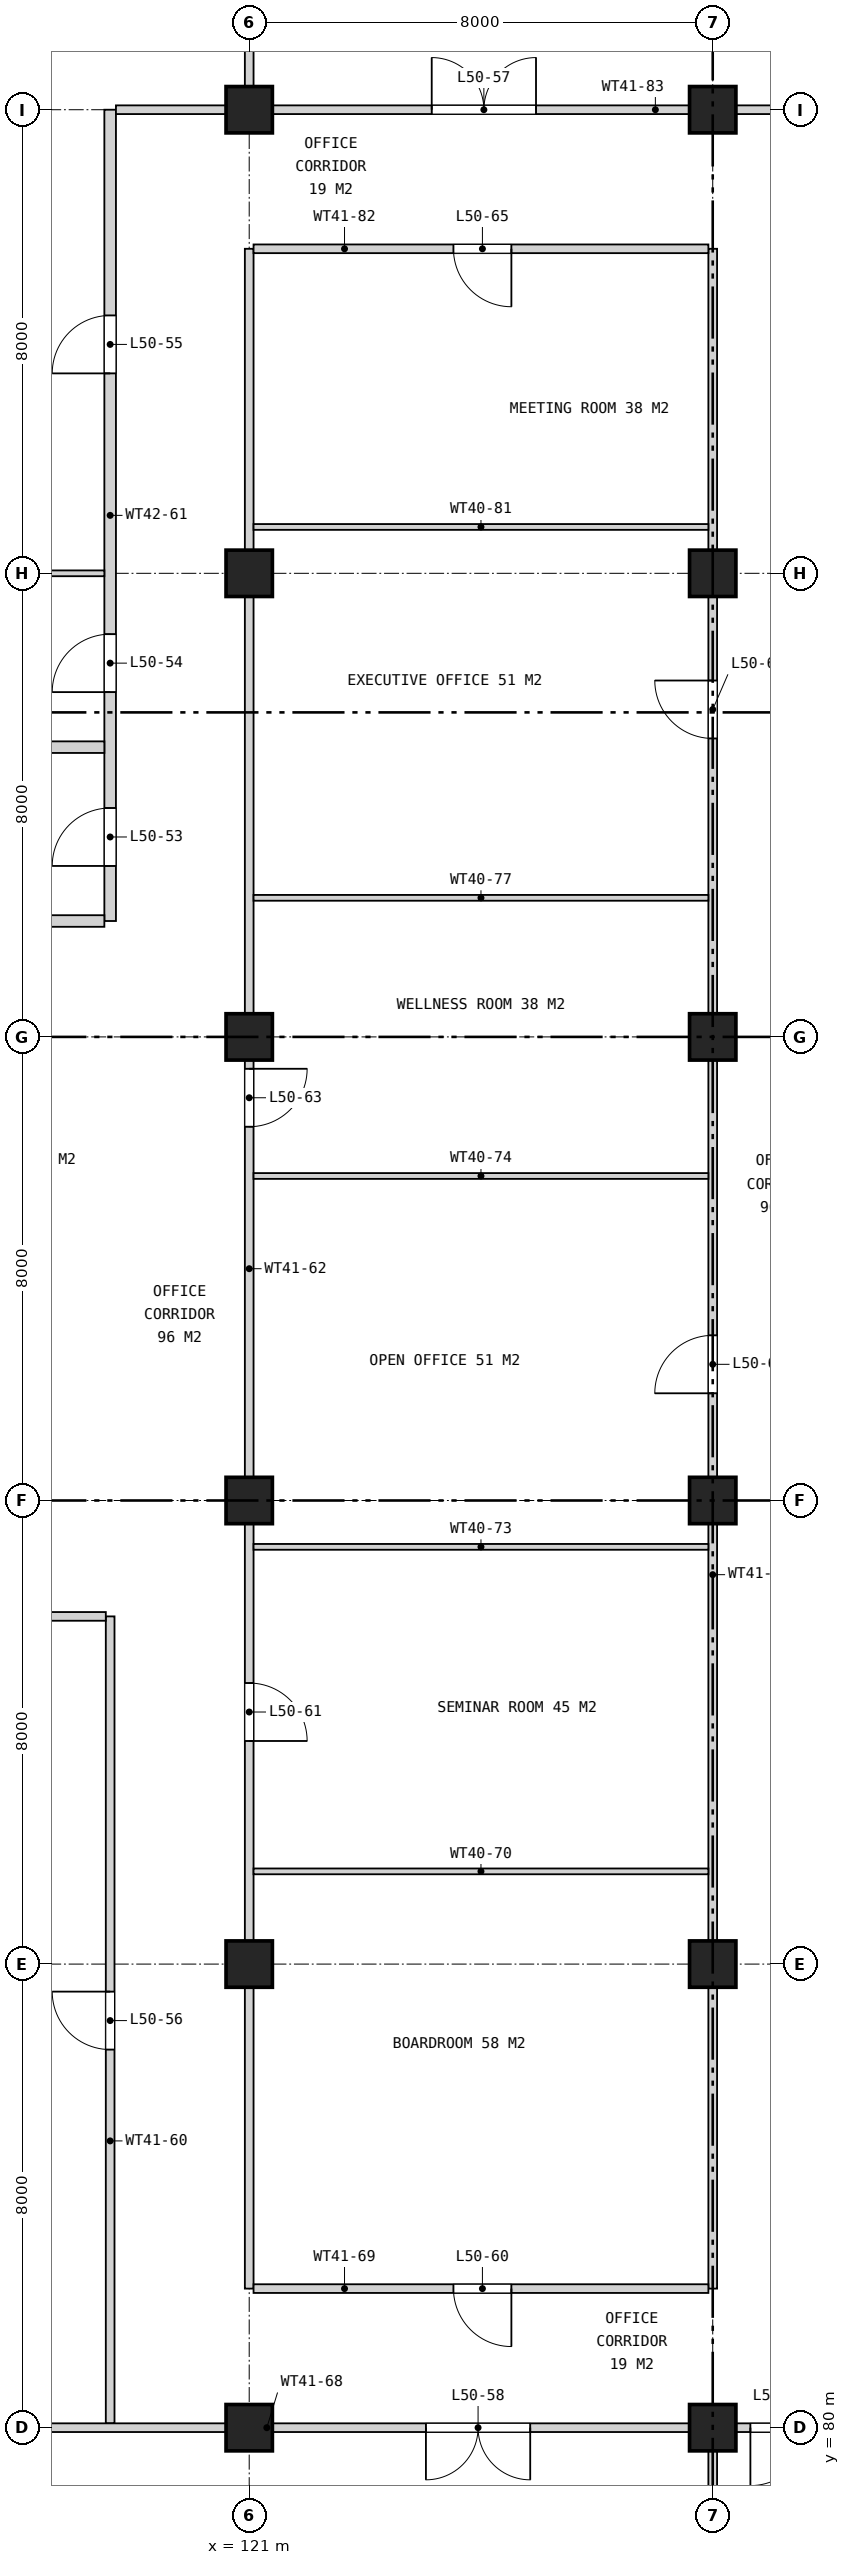
"""IFC4 building model, lengths in metres.
Left out: names, types, materials, properties, quantities, classifications, styles, units other than length and angle.
Written with IfcOpenShell. Run it as: python <this file> out.ifc"""

import sys

from ifc_helpers import new_model, si_unit, direction, frame, frame_2d, origin, origin_2d, place, context, subcontext, project, spatial, rectangle, extrude, element, fill, save


model = new_model("IFC4")
c1 = context("Model", 3, precision=1e-05, world=origin(), true_north=direction((0.0, 1.0)))
c2 = subcontext(c1, "Body", "Model", "MODEL_VIEW")
j1 = project(units=[si_unit("LENGTHUNIT", "METRE"), si_unit("PLANEANGLEUNIT", "RADIAN")], contexts=[c1])
p1 = place(None, origin())
s1 = spatial("IfcSite", under=j1, at=p1, CompositionType="ELEMENT")
p2 = place(p1, origin())
s2 = spatial("IfcBuilding", under=s1, at=p2, CompositionType="ELEMENT")
p3 = place(p2, frame((0.0, 0.0, 233.5)))
s3 = spatial("IfcBuildingStorey", under=s2, at=p3, CompositionType="ELEMENT", Elevation=233.5)
for number, where, z_axis, x_axis in (
    (1, (121.0, 80.0, 0.0), (0.0, 0.0, 1.0), (1.0, 0.0, 0.0)),
    (2, (121.0, 88.0, 0.0), (0.0, 0.0, 1.0), (1.0, 0.0, 0.0)),
    (3, (121.0, 96.0, 0.0), (0.0, 0.0, 1.0), (1.0, 0.0, 0.0)),
    (4, (121.0, 104.0, 0.0), (0.0, 0.0, 1.0), (1.0, 0.0, 0.0)),
    (5, (121.0, 112.0, 0.0), (0.0, 0.0, 1.0), (1.0, 0.0, 0.0)),
    (6, (121.0, 120.0, 0.0), (0.0, 0.0, 1.0), (1.0, 0.0, 0.0)),
    (7, (129.0, 80.0, 0.0), (0.0, 0.0, 1.0), (1.0, 0.0, 0.0)),
    (8, (129.0, 88.0, 0.0), (0.0, 0.0, 1.0), (1.0, 0.0, 0.0)),
    (9, (129.0, 96.0, 0.0), (0.0, 0.0, 1.0), (1.0, 0.0, 0.0)),
    (10, (129.0, 104.0, 0.0), (0.0, 0.0, 1.0), (1.0, 0.0, 0.0)),
    (11, (129.0, 112.0, 0.0), (0.0, 0.0, 1.0), (1.0, 0.0, 0.0)),
    (12, (129.0, 120.0, 0.0), (0.0, 0.0, 1.0), (1.0, 0.0, 0.0)),
):
    element("IfcColumn", number, at=place(p3, frame(where, z_axis=z_axis, x_axis=x_axis)), inside=s3, PredefinedType="COLUMN", context=c2, shape_type="SweptSolid", body=[
        extrude(rectangle(XDim=0.8, YDim=0.8, at=origin_2d()), origin(), (0.0, 0.0, 1.0), 4.2),
    ])
p4 = place(p3, frame((118.6, 80.075, 0.0), z_axis=(0.0, 0.0, 1.0), x_axis=(0.0, 1.0, 0.0)))
e13 = element("IfcWall", 13, at=p4, inside=s3, PredefinedType="PARTITIONING", context=c2, shape_type="SweptSolid", body=[
    extrude(rectangle(XDim=13.925, YDim=0.15, at=frame_2d((6.962, 0.0))), origin(), (0.0, 0.0, 1.0), 3.255),
])
p5 = place(p4, frame((6.45, 0.0, 0.0)))
e14 = element("IfcOpeningElement", 14, at=p5, cuts=e13, PredefinedType="OPENING", context=c2, shape_type="SweptSolid", body=[
    extrude(rectangle(XDim=1.0, YDim=2.1, at=frame_2d((0.5, 1.05))), frame((0.0, 0.085, 0.0), z_axis=(0.0, -1.0, 0.0), x_axis=(1.0, 0.0, 0.0)), (0.0, 0.0, 1.0), 0.17),
])
p6 = place(p3, frame((118.6, 106.0, 0.0), z_axis=(0.0, 0.0, 1.0), x_axis=(0.0, 1.0, 0.0)))
e15 = element("IfcWall", 15, at=p6, inside=s3, PredefinedType="SOLIDWALL", context=c2, shape_type="SweptSolid", body=[
    extrude(rectangle(XDim=14.0, YDim=0.2, at=frame_2d((7.0, 0.0))), origin(), (0.0, 0.0, 1.0), 3.255),
])
p7 = place(p6, frame((0.95, 0.0, 0.0)))
e16 = element("IfcOpeningElement", 16, at=p7, cuts=e15, PredefinedType="OPENING", context=c2, shape_type="SweptSolid", body=[
    extrude(rectangle(XDim=1.0, YDim=2.1, at=frame_2d((0.5, 1.05))), frame((0.0, 0.11, 0.0), z_axis=(0.0, -1.0, 0.0), x_axis=(1.0, 0.0, 0.0)), (0.0, 0.0, 1.0), 0.22),
])
p8 = place(p6, frame((3.95, 0.0, 0.0)))
e17 = element("IfcOpeningElement", 17, at=p8, cuts=e15, PredefinedType="OPENING", context=c2, shape_type="SweptSolid", body=[
    extrude(rectangle(XDim=1.0, YDim=2.1, at=frame_2d((0.5, 1.05))), frame((0.0, 0.11, 0.0), z_axis=(0.0, -1.0, 0.0), x_axis=(1.0, 0.0, 0.0)), (0.0, 0.0, 1.0), 0.22),
])
p9 = place(p6, frame((9.45, 0.0, 0.0)))
e18 = element("IfcOpeningElement", 18, at=p9, cuts=e15, PredefinedType="OPENING", context=c2, shape_type="SweptSolid", body=[
    extrude(rectangle(XDim=1.0, YDim=2.1, at=frame_2d((0.5, 1.05))), frame((0.0, 0.11, 0.0), z_axis=(0.0, -1.0, 0.0), x_axis=(1.0, 0.0, 0.0)), (0.0, 0.0, 1.0), 0.22),
])
p10 = place(p3, frame((121.0, 82.4, 0.0), z_axis=(0.0, 0.0, 1.0), x_axis=(0.0, 1.0, 0.0)))
e19 = element("IfcWall", 19, at=p10, inside=s3, PredefinedType="PARTITIONING", context=c2, shape_type="SweptSolid", body=[
    extrude(rectangle(XDim=35.2, YDim=0.15, at=frame_2d((17.6, 0.0))), origin(), (0.0, 0.0, 1.0), 3.255),
])
p11 = place(p10, frame((9.45, 0.0, 0.0)))
e20 = element("IfcOpeningElement", 20, at=p11, cuts=e19, PredefinedType="OPENING", context=c2, shape_type="SweptSolid", body=[
    extrude(rectangle(XDim=1.0, YDim=2.1, at=frame_2d((0.5, 1.05))), frame((0.0, 0.085, 0.0), z_axis=(0.0, -1.0, 0.0), x_axis=(1.0, 0.0, 0.0)), (0.0, 0.0, 1.0), 0.17),
])
p12 = place(p10, frame((20.05, 0.0, 0.0)))
e21 = element("IfcOpeningElement", 21, at=p12, cuts=e19, PredefinedType="OPENING", context=c2, shape_type="SweptSolid", body=[
    extrude(rectangle(XDim=1.0, YDim=2.1, at=frame_2d((0.5, 1.05))), frame((0.0, 0.085, 0.0), z_axis=(0.0, -1.0, 0.0), x_axis=(1.0, 0.0, 0.0)), (0.0, 0.0, 1.0), 0.17),
])
for number, where, z_axis, x_axis in (
    (22, (121.0, 120.075, 0.0), (0.0, 0.0, 1.0), (0.0, 1.0, 0.0)),
    (23, (129.0, 71.68, 0.0), (0.0, 0.0, 1.0), (0.0, 1.0, 0.0)),
):
    element("IfcWall", number, at=place(p3, frame(where, z_axis=z_axis, x_axis=x_axis)), inside=s3, PredefinedType="PARTITIONING", context=c2, shape_type="SweptSolid", body=[
        extrude(rectangle(XDim=8.245, YDim=0.15, at=frame_2d((4.123, 0.0))), origin(), (0.0, 0.0, 1.0), 3.255),
    ])
p13 = place(p3, frame((129.0, 82.4, 0.0), z_axis=(0.0, 0.0, 1.0), x_axis=(0.0, 1.0, 0.0)))
e24 = element("IfcWall", 24, at=p13, inside=s3, PredefinedType="PARTITIONING", context=c2, shape_type="SweptSolid", body=[
    extrude(rectangle(XDim=35.2, YDim=0.15, at=frame_2d((17.6, 0.0))), origin(), (0.0, 0.0, 1.0), 3.255),
])
p14 = place(p13, frame((15.45, 0.0, 0.0)))
e25 = element("IfcOpeningElement", 25, at=p14, cuts=e24, PredefinedType="OPENING", context=c2, shape_type="SweptSolid", body=[
    extrude(rectangle(XDim=1.0, YDim=2.1, at=frame_2d((0.5, 1.05))), frame((0.0, 0.085, 0.0), z_axis=(0.0, -1.0, 0.0), x_axis=(1.0, 0.0, 0.0)), (0.0, 0.0, 1.0), 0.17),
])
p15 = place(p13, frame((26.75, 0.0, 0.0)))
e26 = element("IfcOpeningElement", 26, at=p15, cuts=e24, PredefinedType="OPENING", context=c2, shape_type="SweptSolid", body=[
    extrude(rectangle(XDim=1.0, YDim=2.1, at=frame_2d((0.5, 1.05))), frame((0.0, 0.085, 0.0), z_axis=(0.0, -1.0, 0.0), x_axis=(1.0, 0.0, 0.0)), (0.0, 0.0, 1.0), 0.17),
])
p16 = place(p3, frame((112.68, 80.0, 0.0), z_axis=(0.0, 0.0, 1.0), x_axis=(1.0, 0.0, 0.0)))
e27 = element("IfcWall", 27, at=p16, inside=s3, PredefinedType="PARTITIONING", context=c2, shape_type="SweptSolid", body=[
    extrude(rectangle(XDim=24.64, YDim=0.15, at=frame_2d((12.32, 0.0))), origin(), (0.0, 0.0, 1.0), 3.255),
])
p17 = place(p16, frame((11.37, 0.0, 0.0)))
e28 = element("IfcOpeningElement", 28, at=p17, cuts=e27, PredefinedType="OPENING", context=c2, shape_type="SweptSolid", body=[
    extrude(rectangle(XDim=1.8, YDim=2.1, at=frame_2d((0.9, 1.05))), frame((0.0, 0.085, 0.0), z_axis=(0.0, -1.0, 0.0), x_axis=(1.0, 0.0, 0.0)), (0.0, 0.0, 1.0), 0.17),
])
p18 = place(p16, frame((16.97, 0.0, 0.0)))
e29 = element("IfcOpeningElement", 29, at=p18, cuts=e27, PredefinedType="OPENING", context=c2, shape_type="SweptSolid", body=[
    extrude(rectangle(XDim=1.0, YDim=2.1, at=frame_2d((0.5, 1.05))), frame((0.0, 0.085, 0.0), z_axis=(0.0, -1.0, 0.0), x_axis=(1.0, 0.0, 0.0)), (0.0, 0.0, 1.0), 0.17),
])
p19 = place(p3, frame((121.075, 82.4, 0.0), z_axis=(0.0, 0.0, 1.0), x_axis=(1.0, 0.0, 0.0)))
e30 = element("IfcWall", 30, at=p19, inside=s3, PredefinedType="PARTITIONING", context=c2, shape_type="SweptSolid", body=[
    extrude(rectangle(XDim=7.85, YDim=0.15, at=frame_2d((3.925, 0.0))), origin(), (0.0, 0.0, 1.0), 3.255),
])
p20 = place(p19, frame((3.45, 0.0, 0.0)))
e31 = element("IfcOpeningElement", 31, at=p20, cuts=e30, PredefinedType="OPENING", context=c2, shape_type="SweptSolid", body=[
    extrude(rectangle(XDim=1.0, YDim=2.1, at=frame_2d((0.5, 1.05))), frame((0.0, 0.085, 0.0), z_axis=(0.0, -1.0, 0.0), x_axis=(1.0, 0.0, 0.0)), (0.0, 0.0, 1.0), 0.17),
])
p21 = place(p3, frame((121.075, 89.6, 0.0), z_axis=(0.0, 0.0, 1.0), x_axis=(1.0, 0.0, 0.0)))
e32 = element("IfcWall", 32, at=p21, inside=s3, PredefinedType="PARTITIONING", context=c2, shape_type="SweptSolid", body=[
    extrude(rectangle(XDim=7.85, YDim=0.1, at=frame_2d((3.925, 0.0))), origin(), (0.0, 0.0, 1.0), 3.255),
])
p22 = place(p3, frame((113.0, 94.0, 0.0), z_axis=(0.0, 0.0, 1.0), x_axis=(1.0, 0.0, 0.0)))
e33 = element("IfcWall", 33, at=p22, inside=s3, PredefinedType="PARTITIONING", context=c2, shape_type="SweptSolid", body=[
    extrude(rectangle(XDim=5.525, YDim=0.15, at=frame_2d((2.762, 0.0))), origin(), (0.0, 0.0, 1.0), 3.255),
])
for number, where, z_axis, x_axis in (
    (34, (121.075, 95.2, 0.0), (0.0, 0.0, 1.0), (1.0, 0.0, 0.0)),
    (35, (121.075, 101.6, 0.0), (0.0, 0.0, 1.0), (1.0, 0.0, 0.0)),
):
    element("IfcWall", number, at=place(p3, frame(where, z_axis=z_axis, x_axis=x_axis)), inside=s3, PredefinedType="PARTITIONING", context=c2, shape_type="SweptSolid", body=[
        extrude(rectangle(XDim=7.85, YDim=0.1, at=frame_2d((3.925, 0.0))), origin(), (0.0, 0.0, 1.0), 3.255),
    ])
p23 = place(p3, frame((113.0, 106.0, 0.0), z_axis=(0.0, 0.0, 1.0), x_axis=(1.0, 0.0, 0.0)))
e36 = element("IfcWall", 36, at=p23, inside=s3, PredefinedType="SOLIDWALL", context=c2, shape_type="SweptSolid", body=[
    extrude(rectangle(XDim=5.5, YDim=0.2, at=frame_2d((2.75, 0.0))), origin(), (0.0, 0.0, 1.0), 3.255),
])
p24 = place(p3, frame((121.075, 106.4, 0.0), z_axis=(0.0, 0.0, 1.0), x_axis=(1.0, 0.0, 0.0)))
e37 = element("IfcWall", 37, at=p24, inside=s3, PredefinedType="PARTITIONING", context=c2, shape_type="SweptSolid", body=[
    extrude(rectangle(XDim=7.85, YDim=0.1, at=frame_2d((3.925, 0.0))), origin(), (0.0, 0.0, 1.0), 3.255),
])
p25 = place(p3, frame((113.0, 109.0, 0.0), z_axis=(0.0, 0.0, 1.0), x_axis=(1.0, 0.0, 0.0)))
e38 = element("IfcWall", 38, at=p25, inside=s3, PredefinedType="SOLIDWALL", context=c2, shape_type="SweptSolid", body=[
    extrude(rectangle(XDim=5.5, YDim=0.2, at=frame_2d((2.75, 0.0))), origin(), (0.0, 0.0, 1.0), 3.255),
])
p26 = place(p3, frame((113.0, 112.0, 0.0), z_axis=(0.0, 0.0, 1.0), x_axis=(1.0, 0.0, 0.0)))
e39 = element("IfcWall", 39, at=p26, inside=s3, PredefinedType="PARTITIONING", context=c2, shape_type="SweptSolid", body=[
    extrude(rectangle(XDim=5.5, YDim=0.1, at=frame_2d((2.75, 0.0))), origin(), (0.0, 0.0, 1.0), 3.255),
])
p27 = place(p3, frame((121.075, 112.8, 0.0), z_axis=(0.0, 0.0, 1.0), x_axis=(1.0, 0.0, 0.0)))
e40 = element("IfcWall", 40, at=p27, inside=s3, PredefinedType="PARTITIONING", context=c2, shape_type="SweptSolid", body=[
    extrude(rectangle(XDim=7.85, YDim=0.1, at=frame_2d((3.925, 0.0))), origin(), (0.0, 0.0, 1.0), 3.255),
])
p28 = place(p3, frame((121.075, 117.6, 0.0), z_axis=(0.0, 0.0, 1.0), x_axis=(1.0, 0.0, 0.0)))
e41 = element("IfcWall", 41, at=p28, inside=s3, PredefinedType="PARTITIONING", context=c2, shape_type="SweptSolid", body=[
    extrude(rectangle(XDim=7.85, YDim=0.15, at=frame_2d((3.925, 0.0))), origin(), (0.0, 0.0, 1.0), 3.255),
])
p29 = place(p28, frame((3.45, 0.0, 0.0)))
e42 = element("IfcOpeningElement", 42, at=p29, cuts=e41, PredefinedType="OPENING", context=c2, shape_type="SweptSolid", body=[
    extrude(rectangle(XDim=1.0, YDim=2.1, at=frame_2d((0.5, 1.05))), frame((0.0, 0.085, 0.0), z_axis=(0.0, -1.0, 0.0), x_axis=(1.0, 0.0, 0.0)), (0.0, 0.0, 1.0), 0.17),
])
p30 = place(p3, frame((118.7, 120.0, 0.0), z_axis=(0.0, 0.0, 1.0), x_axis=(1.0, 0.0, 0.0)))
e43 = element("IfcWall", 43, at=p30, inside=s3, PredefinedType="PARTITIONING", context=c2, shape_type="SweptSolid", body=[
    extrude(rectangle(XDim=18.62, YDim=0.15, at=frame_2d((9.31, 0.0))), origin(), (0.0, 0.0, 1.0), 3.255),
])
p31 = place(p30, frame((5.45, 0.0, 0.0)))
e44 = element("IfcOpeningElement", 44, at=p31, cuts=e43, PredefinedType="OPENING", context=c2, shape_type="SweptSolid", body=[
    extrude(rectangle(XDim=1.8, YDim=2.1, at=frame_2d((0.9, 1.05))), frame((0.0, 0.085, 0.0), z_axis=(0.0, -1.0, 0.0), x_axis=(1.0, 0.0, 0.0)), (0.0, 0.0, 1.0), 0.17),
])
p32 = place(p7, origin())
e45 = element("IfcDoor", 45, at=p32, inside=s3, OperationType="SINGLE_SWING_LEFT", PredefinedType="DOOR", context=c2, shape_type="SweptSolid", body=[
    extrude(rectangle(XDim=1.0, YDim=2.1, at=frame_2d((0.5, 1.05))), frame((0.0, 0.025, 0.0), z_axis=(0.0, -1.0, 0.0), x_axis=(1.0, 0.0, 0.0)), (0.0, 0.0, 1.0), 0.05),
])
fill(e16, e45)
p33 = place(p8, origin())
e46 = element("IfcDoor", 46, at=p33, inside=s3, OperationType="SINGLE_SWING_LEFT", PredefinedType="DOOR", context=c2, shape_type="SweptSolid", body=[
    extrude(rectangle(XDim=1.0, YDim=2.1, at=frame_2d((0.5, 1.05))), frame((0.0, 0.025, 0.0), z_axis=(0.0, -1.0, 0.0), x_axis=(1.0, 0.0, 0.0)), (0.0, 0.0, 1.0), 0.05),
])
fill(e17, e46)
p34 = place(p9, origin())
e47 = element("IfcDoor", 47, at=p34, inside=s3, OperationType="SINGLE_SWING_LEFT", PredefinedType="DOOR", context=c2, shape_type="SweptSolid", body=[
    extrude(rectangle(XDim=1.0, YDim=2.1, at=frame_2d((0.5, 1.05))), frame((0.0, 0.025, 0.0), z_axis=(0.0, -1.0, 0.0), x_axis=(1.0, 0.0, 0.0)), (0.0, 0.0, 1.0), 0.05),
])
fill(e18, e47)
p35 = place(p5, origin())
e48 = element("IfcDoor", 48, at=p35, inside=s3, OperationType="SINGLE_SWING_RIGHT", PredefinedType="DOOR", context=c2, shape_type="SweptSolid", body=[
    extrude(rectangle(XDim=1.0, YDim=2.1, at=frame_2d((0.5, 1.05))), frame((0.0, 0.025, 0.0), z_axis=(0.0, -1.0, 0.0), x_axis=(1.0, 0.0, 0.0)), (0.0, 0.0, 1.0), 0.05),
])
fill(e14, e48)
p36 = place(p31, origin())
e49 = element("IfcDoor", 49, at=p36, inside=s3, OperationType="DOUBLE_DOOR_SINGLE_SWING", PredefinedType="DOOR", context=c2, shape_type="SweptSolid", body=[
    extrude(rectangle(XDim=1.8, YDim=2.1, at=frame_2d((0.9, 1.05))), frame((0.0, 0.025, 0.0), z_axis=(0.0, -1.0, 0.0), x_axis=(1.0, 0.0, 0.0)), (0.0, 0.0, 1.0), 0.05),
])
fill(e44, e49)
p37 = place(p17, frame((1.8, 0.0, 0.0), z_axis=(0.0, 0.0, 1.0), x_axis=(-1.0, 0.0, 0.0)))
e50 = element("IfcDoor", 50, at=p37, inside=s3, OperationType="DOUBLE_DOOR_SINGLE_SWING", PredefinedType="DOOR", context=c2, shape_type="SweptSolid", body=[
    extrude(rectangle(XDim=1.8, YDim=2.1, at=frame_2d((0.9, 1.05))), frame((0.0, 0.025, 0.0), z_axis=(0.0, -1.0, 0.0), x_axis=(1.0, 0.0, 0.0)), (0.0, 0.0, 1.0), 0.05),
])
fill(e28, e50)
p38 = place(p18, frame((1.0, 0.0, 0.0), z_axis=(0.0, 0.0, 1.0), x_axis=(-1.0, 0.0, 0.0)))
e51 = element("IfcDoor", 51, at=p38, inside=s3, OperationType="SINGLE_SWING_RIGHT", PredefinedType="DOOR", context=c2, shape_type="SweptSolid", body=[
    extrude(rectangle(XDim=1.0, YDim=2.1, at=frame_2d((0.5, 1.05))), frame((0.0, 0.025, 0.0), z_axis=(0.0, -1.0, 0.0), x_axis=(1.0, 0.0, 0.0)), (0.0, 0.0, 1.0), 0.05),
])
fill(e29, e51)
p39 = place(p20, frame((1.0, 0.0, 0.0), z_axis=(0.0, 0.0, 1.0), x_axis=(-1.0, 0.0, 0.0)))
e52 = element("IfcDoor", 52, at=p39, inside=s3, OperationType="SINGLE_SWING_LEFT", PredefinedType="DOOR", context=c2, shape_type="SweptSolid", body=[
    extrude(rectangle(XDim=1.0, YDim=2.1, at=frame_2d((0.5, 1.05))), frame((0.0, 0.025, 0.0), z_axis=(0.0, -1.0, 0.0), x_axis=(1.0, 0.0, 0.0)), (0.0, 0.0, 1.0), 0.05),
])
fill(e31, e52)
p40 = place(p11, frame((1.0, 0.0, 0.0), z_axis=(0.0, 0.0, 1.0), x_axis=(-1.0, 0.0, 0.0)))
e53 = element("IfcDoor", 53, at=p40, inside=s3, OperationType="SINGLE_SWING_RIGHT", PredefinedType="DOOR", context=c2, shape_type="SweptSolid", body=[
    extrude(rectangle(XDim=1.0, YDim=2.1, at=frame_2d((0.5, 1.05))), frame((0.0, 0.025, 0.0), z_axis=(0.0, -1.0, 0.0), x_axis=(1.0, 0.0, 0.0)), (0.0, 0.0, 1.0), 0.05),
])
fill(e20, e53)
p41 = place(p14, origin())
e54 = element("IfcDoor", 54, at=p41, inside=s3, OperationType="SINGLE_SWING_LEFT", PredefinedType="DOOR", context=c2, shape_type="SweptSolid", body=[
    extrude(rectangle(XDim=1.0, YDim=2.1, at=frame_2d((0.5, 1.05))), frame((0.0, 0.025, 0.0), z_axis=(0.0, -1.0, 0.0), x_axis=(1.0, 0.0, 0.0)), (0.0, 0.0, 1.0), 0.05),
])
fill(e25, e54)
p42 = place(p12, frame((1.0, 0.0, 0.0), z_axis=(0.0, 0.0, 1.0), x_axis=(-1.0, 0.0, 0.0)))
e55 = element("IfcDoor", 55, at=p42, inside=s3, OperationType="SINGLE_SWING_LEFT", PredefinedType="DOOR", context=c2, shape_type="SweptSolid", body=[
    extrude(rectangle(XDim=1.0, YDim=2.1, at=frame_2d((0.5, 1.05))), frame((0.0, 0.025, 0.0), z_axis=(0.0, -1.0, 0.0), x_axis=(1.0, 0.0, 0.0)), (0.0, 0.0, 1.0), 0.05),
])
fill(e21, e55)
p43 = place(p15, origin())
e56 = element("IfcDoor", 56, at=p43, inside=s3, OperationType="SINGLE_SWING_RIGHT", PredefinedType="DOOR", context=c2, shape_type="SweptSolid", body=[
    extrude(rectangle(XDim=1.0, YDim=2.1, at=frame_2d((0.5, 1.05))), frame((0.0, 0.025, 0.0), z_axis=(0.0, -1.0, 0.0), x_axis=(1.0, 0.0, 0.0)), (0.0, 0.0, 1.0), 0.05),
])
fill(e26, e56)
p44 = place(p29, frame((1.0, 0.0, 0.0), z_axis=(0.0, 0.0, 1.0), x_axis=(-1.0, 0.0, 0.0)))
e57 = element("IfcDoor", 57, at=p44, inside=s3, OperationType="SINGLE_SWING_LEFT", PredefinedType="DOOR", context=c2, shape_type="SweptSolid", body=[
    extrude(rectangle(XDim=1.0, YDim=2.1, at=frame_2d((0.5, 1.05))), frame((0.0, 0.025, 0.0), z_axis=(0.0, -1.0, 0.0), x_axis=(1.0, 0.0, 0.0)), (0.0, 0.0, 1.0), 0.05),
])
fill(e42, e57)
save(model, sys.argv[1])
